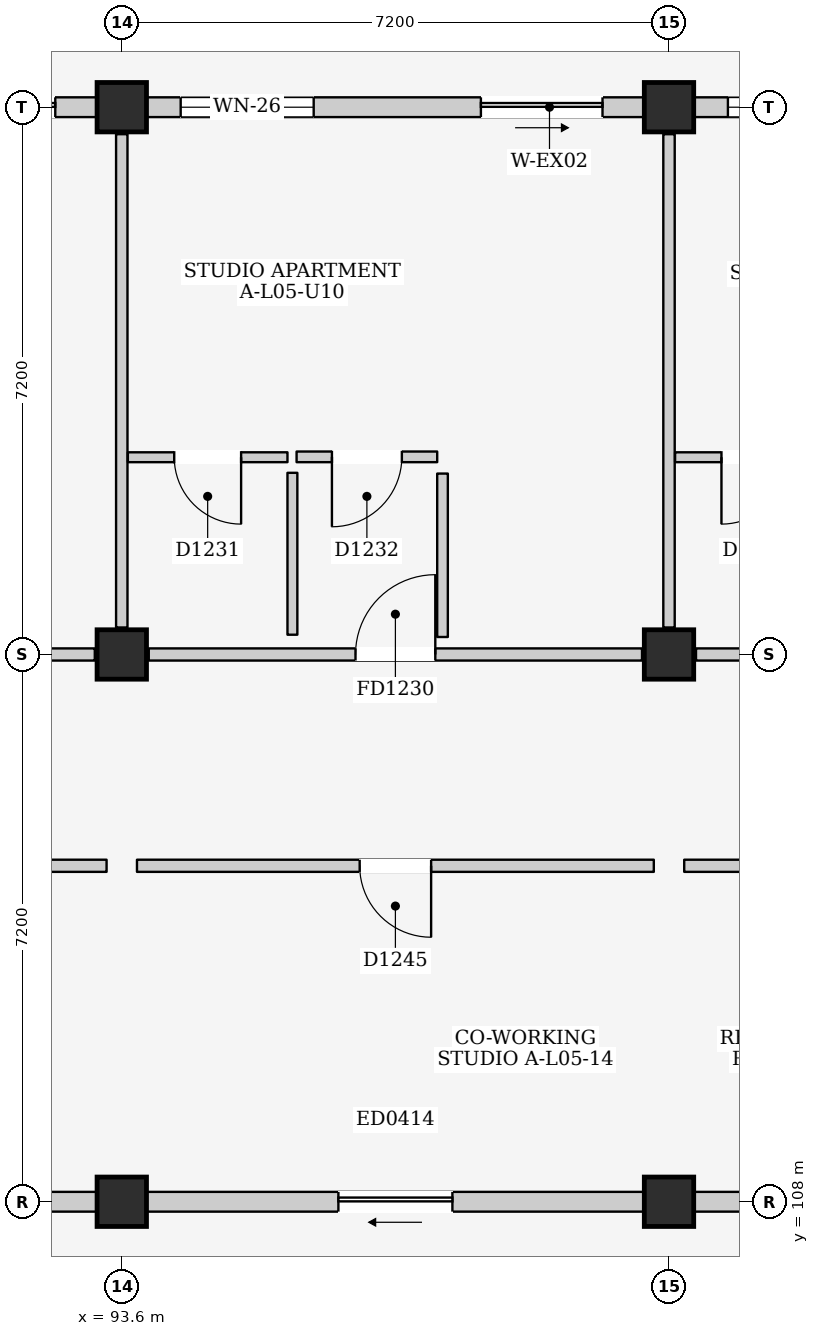
"""IFC4 building model, lengths in metres.
Left out: names, types, materials, properties, quantities, classifications, styles, units other than length and angle.
Written with IfcOpenShell. Run it as: python <this file> out.ifc"""

import sys

from ifc_helpers import new_model, si_unit, direction, frame, frame_2d, origin, origin_2d, place, context, subcontext, project, spatial, rectangle, extrude, element, fill, save


model = new_model("IFC4")
c1 = context("Model", 3, precision=1e-05, world=origin(), true_north=direction((0.0, 1.0)))
c2 = subcontext(c1, "Body", "Model", "MODEL_VIEW")
j1 = project(units=[si_unit("LENGTHUNIT", "METRE"), si_unit("PLANEANGLEUNIT", "RADIAN")], contexts=[c1])
p1 = place(None, origin())
s1 = spatial("IfcSite", under=j1, at=p1, CompositionType="ELEMENT")
p2 = place(p1, origin())
s2 = spatial("IfcBuilding", under=s1, at=p2, CompositionType="ELEMENT")
p3 = place(p2, frame((0.0, 0.0, 18.6)))
s3 = spatial("IfcBuildingStorey", under=s2, at=p3, CompositionType="ELEMENT", Elevation=18.6)
for number, where, z_axis, x_axis in (
    (1, (93.6, 108.0, 0.0), (0.0, 0.0, 1.0), (1.0, 0.0, 0.0)),
    (2, (93.6, 115.2, 0.0), (0.0, 0.0, 1.0), (1.0, 0.0, 0.0)),
    (3, (93.6, 122.4, 0.0), (0.0, 0.0, 1.0), (1.0, 0.0, 0.0)),
    (4, (100.8, 108.0, 0.0), (0.0, 0.0, 1.0), (1.0, 0.0, 0.0)),
    (5, (100.8, 115.2, 0.0), (0.0, 0.0, 1.0), (1.0, 0.0, 0.0)),
    (6, (100.8, 122.4, 0.0), (0.0, 0.0, 1.0), (1.0, 0.0, 0.0)),
):
    element("IfcColumn", number, at=place(p3, frame(where, z_axis=z_axis, x_axis=x_axis)), inside=s3, PredefinedType="COLUMN", context=c2, shape_type="SweptSolid", body=[
        extrude(rectangle(XDim=0.65, YDim=0.65, at=origin_2d()), origin(), (0.0, 0.0, 1.0), 3.3),
    ])
p4 = place(p3, frame((86.725, 122.4, 0.0), z_axis=(0.0, 0.0, 1.0), x_axis=(1.0, 0.0, 0.0)))
e7 = element("IfcWall", 7, at=p4, inside=s3, PredefinedType="ELEMENTEDWALL", context=c2, shape_type="SweptSolid", body=[
    extrude(rectangle(XDim=6.55, YDim=0.26, at=frame_2d((3.275, 0.0))), origin(), (0.0, 0.0, 1.0), 2.595),
])
p5 = place(p4, frame((4.2, 0.0, 0.0)))
e8 = element("IfcOpeningElement", 8, at=p5, cuts=e7, PredefinedType="OPENING", context=c2, shape_type="SweptSolid", body=[
    extrude(rectangle(XDim=1.8, YDim=2.12, at=frame_2d((0.9, 1.06))), frame((0.0, 0.145, 0.0), z_axis=(0.0, -1.0, 0.0), x_axis=(1.0, 0.0, 0.0)), (0.0, 0.0, 1.0), 0.29),
])
p6 = place(p4, frame((0.45, 0.0, 0.885)))
e9 = element("IfcOpeningElement", 9, at=p6, cuts=e7, PredefinedType="OPENING", context=c2, shape_type="SweptSolid", body=[
    extrude(rectangle(XDim=2.05, YDim=1.6, at=frame_2d((1.025, 0.8))), frame((0.0, 0.145, 0.0), z_axis=(0.0, -1.0, 0.0), x_axis=(1.0, 0.0, 0.0)), (0.0, 0.0, 1.0), 0.29),
])
p7 = place(p3, frame((86.725, 108.0, 0.0), z_axis=(0.0, 0.0, 1.0), x_axis=(1.0, 0.0, 0.0)))
e10 = element("IfcWall", 10, at=p7, inside=s3, PredefinedType="ELEMENTEDWALL", context=c2, shape_type="SweptSolid", body=[
    extrude(rectangle(XDim=6.55, YDim=0.26, at=frame_2d((3.275, 0.0))), origin(), (0.0, 0.0, 1.0), 2.395),
])
p8 = place(p7, frame((2.525, 0.0, 0.0)))
e11 = element("IfcOpeningElement", 11, at=p8, cuts=e10, PredefinedType="OPENING", context=c2, shape_type="SweptSolid", body=[
    extrude(rectangle(XDim=1.5, YDim=2.12, at=frame_2d((0.75, 1.06))), frame((0.0, 0.145, 0.0), z_axis=(0.0, -1.0, 0.0), x_axis=(1.0, 0.0, 0.0)), (0.0, 0.0, 1.0), 0.29),
])
p9 = place(p3, frame((93.925, 122.4, 0.0), z_axis=(0.0, 0.0, 1.0), x_axis=(1.0, 0.0, 0.0)))
e12 = element("IfcWall", 12, at=p9, inside=s3, PredefinedType="ELEMENTEDWALL", context=c2, shape_type="SweptSolid", body=[
    extrude(rectangle(XDim=6.55, YDim=0.26, at=frame_2d((3.275, 0.0))), origin(), (0.0, 0.0, 1.0), 2.595),
])
p10 = place(p9, frame((4.4, 0.0, 0.0)))
e13 = element("IfcOpeningElement", 13, at=p10, cuts=e12, PredefinedType="OPENING", context=c2, shape_type="SweptSolid", body=[
    extrude(rectangle(XDim=1.6, YDim=2.12, at=frame_2d((0.8, 1.06))), frame((0.0, 0.145, 0.0), z_axis=(0.0, -1.0, 0.0), x_axis=(1.0, 0.0, 0.0)), (0.0, 0.0, 1.0), 0.29),
])
p11 = place(p9, frame((0.45, 0.0, 0.9)))
e14 = element("IfcOpeningElement", 14, at=p11, cuts=e12, PredefinedType="OPENING", context=c2, shape_type="SweptSolid", body=[
    extrude(rectangle(XDim=1.75, YDim=1.55, at=frame_2d((0.875, 0.775))), frame((0.0, 0.145, 0.0), z_axis=(0.0, -1.0, 0.0), x_axis=(1.0, 0.0, 0.0)), (0.0, 0.0, 1.0), 0.29),
])
p12 = place(p3, frame((93.925, 108.0, 0.0), z_axis=(0.0, 0.0, 1.0), x_axis=(1.0, 0.0, 0.0)))
e15 = element("IfcWall", 15, at=p12, inside=s3, PredefinedType="ELEMENTEDWALL", context=c2, shape_type="SweptSolid", body=[
    extrude(rectangle(XDim=6.55, YDim=0.26, at=frame_2d((3.275, 0.0))), origin(), (0.0, 0.0, 1.0), 2.395),
])
p13 = place(p12, frame((2.525, 0.0, 0.0)))
e16 = element("IfcOpeningElement", 16, at=p13, cuts=e15, PredefinedType="OPENING", context=c2, shape_type="SweptSolid", body=[
    extrude(rectangle(XDim=1.5, YDim=2.12, at=frame_2d((0.75, 1.06))), frame((0.0, 0.145, 0.0), z_axis=(0.0, -1.0, 0.0), x_axis=(1.0, 0.0, 0.0)), (0.0, 0.0, 1.0), 0.29),
])
p14 = place(p3, frame((101.125, 122.4, 0.0), z_axis=(0.0, 0.0, 1.0), x_axis=(1.0, 0.0, 0.0)))
e17 = element("IfcWall", 17, at=p14, inside=s3, PredefinedType="ELEMENTEDWALL", context=c2, shape_type="SweptSolid", body=[
    extrude(rectangle(XDim=6.55, YDim=0.26, at=frame_2d((3.275, 0.0))), origin(), (0.0, 0.0, 1.0), 2.595),
])
p15 = place(p14, frame((4.5, 0.0, 0.0)))
e18 = element("IfcOpeningElement", 18, at=p15, cuts=e17, PredefinedType="OPENING", context=c2, shape_type="SweptSolid", body=[
    extrude(rectangle(XDim=1.5, YDim=2.12, at=frame_2d((0.75, 1.06))), frame((0.0, 0.145, 0.0), z_axis=(0.0, -1.0, 0.0), x_axis=(1.0, 0.0, 0.0)), (0.0, 0.0, 1.0), 0.29),
])
p16 = place(p14, frame((0.45, 0.0, 0.9)))
e19 = element("IfcOpeningElement", 19, at=p16, cuts=e17, PredefinedType="OPENING", context=c2, shape_type="SweptSolid", body=[
    extrude(rectangle(XDim=1.8, YDim=1.5, at=frame_2d((0.9, 0.75))), frame((0.0, 0.145, 0.0), z_axis=(0.0, -1.0, 0.0), x_axis=(1.0, 0.0, 0.0)), (0.0, 0.0, 1.0), 0.29),
])
p17 = place(p3, frame((101.125, 108.0, 0.0), z_axis=(0.0, 0.0, 1.0), x_axis=(1.0, 0.0, 0.0)))
e20 = element("IfcWall", 20, at=p17, inside=s3, PredefinedType="ELEMENTEDWALL", context=c2, shape_type="SweptSolid", body=[
    extrude(rectangle(XDim=6.55, YDim=0.26, at=frame_2d((3.275, 0.0))), origin(), (0.0, 0.0, 1.0), 2.395),
])
p18 = place(p17, frame((2.525, 0.0, 0.0)))
e21 = element("IfcOpeningElement", 21, at=p18, cuts=e20, PredefinedType="OPENING", context=c2, shape_type="SweptSolid", body=[
    extrude(rectangle(XDim=1.5, YDim=2.12, at=frame_2d((0.75, 1.06))), frame((0.0, 0.145, 0.0), z_axis=(0.0, -1.0, 0.0), x_axis=(1.0, 0.0, 0.0)), (0.0, 0.0, 1.0), 0.29),
])
p19 = place(p3, frame((86.755, 115.2, 0.0), z_axis=(0.0, 0.0, 1.0), x_axis=(1.0, 0.0, 0.0)))
e22 = element("IfcWall", 22, at=p19, inside=s3, PredefinedType="PARTITIONING", context=c2, shape_type="SweptSolid", body=[
    extrude(rectangle(XDim=6.49, YDim=0.16, at=frame_2d((3.245, 0.0))), origin(), (0.0, 0.0, 1.0), 2.395),
])
p20 = place(p19, frame((2.72, 0.0, 0.0)))
e23 = element("IfcOpeningElement", 23, at=p20, cuts=e22, PredefinedType="OPENING", context=c2, shape_type="SweptSolid", body=[
    extrude(rectangle(XDim=1.05, YDim=2.15, at=frame_2d((0.525, 1.075))), frame((0.0, 0.095, 0.0), z_axis=(0.0, -1.0, 0.0), x_axis=(1.0, 0.0, 0.0)), (0.0, 0.0, 1.0), 0.19),
])
p21 = place(p3, frame((93.6, 115.555, 0.0), z_axis=(0.0, 0.0, 1.0), x_axis=(0.0, 1.0, 0.0)))
e24 = element("IfcWall", 24, at=p21, inside=s3, PredefinedType="PARTITIONING", context=c2, shape_type="SweptSolid", body=[
    extrude(rectangle(XDim=6.49, YDim=0.15, at=frame_2d((3.245, 0.0))), origin(), (0.0, 0.0, 1.0), 2.545),
])
p22 = place(p3, frame((93.955, 115.2, 0.0), z_axis=(0.0, 0.0, 1.0), x_axis=(1.0, 0.0, 0.0)))
e25 = element("IfcWall", 25, at=p22, inside=s3, PredefinedType="PARTITIONING", context=c2, shape_type="SweptSolid", body=[
    extrude(rectangle(XDim=6.49, YDim=0.16, at=frame_2d((3.245, 0.0))), origin(), (0.0, 0.0, 1.0), 2.395),
])
p23 = place(p22, frame((2.72, 0.0, 0.0)))
e26 = element("IfcOpeningElement", 26, at=p23, cuts=e25, PredefinedType="OPENING", context=c2, shape_type="SweptSolid", body=[
    extrude(rectangle(XDim=1.05, YDim=2.15, at=frame_2d((0.525, 1.075))), frame((0.0, 0.095, 0.0), z_axis=(0.0, -1.0, 0.0), x_axis=(1.0, 0.0, 0.0)), (0.0, 0.0, 1.0), 0.19),
])
p24 = place(p3, frame((100.8, 115.555, 0.0), z_axis=(0.0, 0.0, 1.0), x_axis=(0.0, 1.0, 0.0)))
e27 = element("IfcWall", 27, at=p24, inside=s3, PredefinedType="PARTITIONING", context=c2, shape_type="SweptSolid", body=[
    extrude(rectangle(XDim=6.49, YDim=0.15, at=frame_2d((3.245, 0.0))), origin(), (0.0, 0.0, 1.0), 2.545),
])
p25 = place(p3, frame((93.68, 117.795, 0.0), z_axis=(0.0, 0.0, 1.0), x_axis=(1.0, 0.0, 0.0)))
e28 = element("IfcWall", 28, at=p25, inside=s3, PredefinedType="PARTITIONING", context=c2, shape_type="SweptSolid", body=[
    extrude(rectangle(XDim=2.1, YDim=0.13, at=frame_2d((1.05, 0.0))), origin(), (0.0, 0.0, 1.0), 3.06),
])
p26 = place(p25, frame((0.61, 0.0, 0.0)))
e29 = element("IfcOpeningElement", 29, at=p26, cuts=e28, PredefinedType="OPENING", context=c2, shape_type="SweptSolid", body=[
    extrude(rectangle(XDim=0.88, YDim=2.1, at=frame_2d((0.44, 1.05))), frame((0.0, 0.08, 0.0), z_axis=(0.0, -1.0, 0.0), x_axis=(1.0, 0.0, 0.0)), (0.0, 0.0, 1.0), 0.16),
])
p27 = place(p3, frame((95.845, 115.46, 0.0), z_axis=(0.0, 0.0, 1.0), x_axis=(0.0, 1.0, 0.0)))
e30 = element("IfcWall", 30, at=p27, inside=s3, PredefinedType="PARTITIONING", context=c2, shape_type="SweptSolid", body=[
    extrude(rectangle(XDim=2.13, YDim=0.13, at=frame_2d((1.065, 0.0))), origin(), (0.0, 0.0, 1.0), 3.06),
])
p28 = place(p3, frame((95.9, 117.8, 0.0), z_axis=(0.0, 0.0, 1.0), x_axis=(1.0, 0.0, 0.0)))
e31 = element("IfcWall", 31, at=p28, inside=s3, PredefinedType="PARTITIONING", context=c2, shape_type="SweptSolid", body=[
    extrude(rectangle(XDim=1.85, YDim=0.14, at=frame_2d((0.925, 0.0))), origin(), (0.0, 0.0, 1.0), 3.06),
])
p29 = place(p28, frame((0.465, 0.0, 0.0)))
e32 = element("IfcOpeningElement", 32, at=p29, cuts=e31, PredefinedType="OPENING", context=c2, shape_type="SweptSolid", body=[
    extrude(rectangle(XDim=0.92, YDim=2.1, at=frame_2d((0.46, 1.05))), frame((0.0, 0.085, 0.0), z_axis=(0.0, -1.0, 0.0), x_axis=(1.0, 0.0, 0.0)), (0.0, 0.0, 1.0), 0.17),
])
p30 = place(p3, frame((97.82, 115.43, 0.0), z_axis=(0.0, 0.0, 1.0), x_axis=(0.0, 1.0, 0.0)))
e33 = element("IfcWall", 33, at=p30, inside=s3, PredefinedType="PARTITIONING", context=c2, shape_type="SweptSolid", body=[
    extrude(rectangle(XDim=2.15, YDim=0.14, at=frame_2d((1.075, 0.0))), origin(), (0.0, 0.0, 1.0), 3.06),
])
p31 = place(p3, frame((101.155, 115.2, 0.0), z_axis=(0.0, 0.0, 1.0), x_axis=(1.0, 0.0, 0.0)))
e34 = element("IfcWall", 34, at=p31, inside=s3, PredefinedType="PARTITIONING", context=c2, shape_type="SweptSolid", body=[
    extrude(rectangle(XDim=6.49, YDim=0.16, at=frame_2d((3.245, 0.0))), origin(), (0.0, 0.0, 1.0), 2.395),
])
p32 = place(p31, frame((2.72, 0.0, 0.0)))
e35 = element("IfcOpeningElement", 35, at=p32, cuts=e34, PredefinedType="OPENING", context=c2, shape_type="SweptSolid", body=[
    extrude(rectangle(XDim=1.05, YDim=2.15, at=frame_2d((0.525, 1.075))), frame((0.0, 0.095, 0.0), z_axis=(0.0, -1.0, 0.0), x_axis=(1.0, 0.0, 0.0)), (0.0, 0.0, 1.0), 0.19),
])
p33 = place(p3, frame((100.88, 117.795, 0.0), z_axis=(0.0, 0.0, 1.0), x_axis=(1.0, 0.0, 0.0)))
e36 = element("IfcWall", 36, at=p33, inside=s3, PredefinedType="PARTITIONING", context=c2, shape_type="SweptSolid", body=[
    extrude(rectangle(XDim=2.1, YDim=0.13, at=frame_2d((1.05, 0.0))), origin(), (0.0, 0.0, 1.0), 3.06),
])
p34 = place(p33, frame((0.61, 0.0, 0.0)))
e37 = element("IfcOpeningElement", 37, at=p34, cuts=e36, PredefinedType="OPENING", context=c2, shape_type="SweptSolid", body=[
    extrude(rectangle(XDim=0.88, YDim=2.1, at=frame_2d((0.44, 1.05))), frame((0.0, 0.08, 0.0), z_axis=(0.0, -1.0, 0.0), x_axis=(1.0, 0.0, 0.0)), (0.0, 0.0, 1.0), 0.16),
])
p35 = place(p3, frame((86.6, 112.42, 0.0), z_axis=(0.0, 0.0, 1.0), x_axis=(1.0, 0.0, 0.0)))
e38 = element("IfcWall", 38, at=p35, inside=s3, PredefinedType="PARTITIONING", context=c2, shape_type="SweptSolid", body=[
    extrude(rectangle(XDim=6.8, YDim=0.16, at=frame_2d((3.4, 0.0))), origin(), (0.0, 0.0, 1.0), 3.06),
])
p36 = place(p35, frame((2.93, 0.0, 0.0)))
e39 = element("IfcOpeningElement", 39, at=p36, cuts=e38, PredefinedType="OPENING", context=c2, shape_type="SweptSolid", body=[
    extrude(rectangle(XDim=0.94, YDim=2.12, at=frame_2d((0.47, 1.06))), frame((0.0, 0.095, 0.0), z_axis=(0.0, -1.0, 0.0), x_axis=(1.0, 0.0, 0.0)), (0.0, 0.0, 1.0), 0.19),
])
p37 = place(p3, frame((93.8, 112.42, 0.0), z_axis=(0.0, 0.0, 1.0), x_axis=(1.0, 0.0, 0.0)))
e40 = element("IfcWall", 40, at=p37, inside=s3, PredefinedType="PARTITIONING", context=c2, shape_type="SweptSolid", body=[
    extrude(rectangle(XDim=6.8, YDim=0.16, at=frame_2d((3.4, 0.0))), origin(), (0.0, 0.0, 1.0), 3.06),
])
p38 = place(p37, frame((2.93, 0.0, 0.0)))
e41 = element("IfcOpeningElement", 41, at=p38, cuts=e40, PredefinedType="OPENING", context=c2, shape_type="SweptSolid", body=[
    extrude(rectangle(XDim=0.94, YDim=2.12, at=frame_2d((0.47, 1.06))), frame((0.0, 0.095, 0.0), z_axis=(0.0, -1.0, 0.0), x_axis=(1.0, 0.0, 0.0)), (0.0, 0.0, 1.0), 0.19),
])
p39 = place(p3, frame((101.0, 112.42, 0.0), z_axis=(0.0, 0.0, 1.0), x_axis=(1.0, 0.0, 0.0)))
e42 = element("IfcWall", 42, at=p39, inside=s3, PredefinedType="PARTITIONING", context=c2, shape_type="SweptSolid", body=[
    extrude(rectangle(XDim=6.8, YDim=0.16, at=frame_2d((3.4, 0.0))), origin(), (0.0, 0.0, 1.0), 3.06),
])
p40 = place(p39, frame((2.93, 0.0, 0.0)))
e43 = element("IfcOpeningElement", 43, at=p40, cuts=e42, PredefinedType="OPENING", context=c2, shape_type="SweptSolid", body=[
    extrude(rectangle(XDim=0.94, YDim=2.12, at=frame_2d((0.47, 1.06))), frame((0.0, 0.095, 0.0), z_axis=(0.0, -1.0, 0.0), x_axis=(1.0, 0.0, 0.0)), (0.0, 0.0, 1.0), 0.19),
])
p41 = place(p5, frame((1.8, 0.0, 0.0), z_axis=(0.0, 0.0, 1.0), x_axis=(-1.0, 0.0, 0.0)))
e44 = element("IfcDoor", 44, at=p41, inside=s3, OperationType="SLIDING_TO_LEFT", PredefinedType="DOOR", context=c2, shape_type="SweptSolid", body=[
    extrude(rectangle(XDim=1.8, YDim=2.12, at=frame_2d((0.9, 1.06))), frame((0.0, 0.025, 0.0), z_axis=(0.0, -1.0, 0.0), x_axis=(1.0, 0.0, 0.0)), (0.0, 0.0, 1.0), 0.05),
])
fill(e8, e44)
p42 = place(p10, frame((1.6, 0.0, 0.0), z_axis=(0.0, 0.0, 1.0), x_axis=(-1.0, 0.0, 0.0)))
e45 = element("IfcDoor", 45, at=p42, inside=s3, OperationType="SLIDING_TO_RIGHT", PredefinedType="DOOR", context=c2, shape_type="SweptSolid", body=[
    extrude(rectangle(XDim=1.6, YDim=2.12, at=frame_2d((0.8, 1.06))), frame((0.0, 0.025, 0.0), z_axis=(0.0, -1.0, 0.0), x_axis=(1.0, 0.0, 0.0)), (0.0, 0.0, 1.0), 0.05),
])
fill(e13, e45)
p43 = place(p11, origin())
e46 = element("IfcWindow", 46, at=p43, inside=s3, PartitioningType="DOUBLE_PANEL_VERTICAL", PredefinedType="WINDOW", context=c2, shape_type="SweptSolid", body=[
    extrude(rectangle(XDim=1.75, YDim=1.55, at=frame_2d((0.875, 0.775))), frame((0.0, 0.03, 0.0), z_axis=(0.0, -1.0, 0.0), x_axis=(1.0, 0.0, 0.0)), (0.0, 0.0, 1.0), 0.06),
])
fill(e14, e46)
p44 = place(p13, frame((1.5, 0.0, 0.0), z_axis=(0.0, 0.0, 1.0), x_axis=(-1.0, 0.0, 0.0)))
e47 = element("IfcDoor", 47, at=p44, inside=s3, OperationType="SLIDING_TO_LEFT", PredefinedType="DOOR", context=c2, shape_type="SweptSolid", body=[
    extrude(rectangle(XDim=1.5, YDim=2.12, at=frame_2d((0.75, 1.06))), frame((0.0, 0.025, 0.0), z_axis=(0.0, -1.0, 0.0), x_axis=(1.0, 0.0, 0.0)), (0.0, 0.0, 1.0), 0.05),
])
fill(e16, e47)
p45 = place(p16, origin())
e48 = element("IfcWindow", 48, at=p45, inside=s3, PartitioningType="DOUBLE_PANEL_VERTICAL", PredefinedType="WINDOW", context=c2, shape_type="SweptSolid", body=[
    extrude(rectangle(XDim=1.8, YDim=1.5, at=frame_2d((0.9, 0.75))), frame((0.0, 0.03, 0.0), z_axis=(0.0, -1.0, 0.0), x_axis=(1.0, 0.0, 0.0)), (0.0, 0.0, 1.0), 0.06),
])
fill(e19, e48)
p46 = place(p23, origin())
e49 = element("IfcDoor", 49, at=p46, inside=s3, OperationType="SINGLE_SWING_RIGHT", PredefinedType="DOOR", context=c2, shape_type="SweptSolid", body=[
    extrude(rectangle(XDim=1.05, YDim=2.15, at=frame_2d((0.525, 1.075))), frame((0.0, 0.025, 0.0), z_axis=(0.0, -1.0, 0.0), x_axis=(1.0, 0.0, 0.0)), (0.0, 0.0, 1.0), 0.05),
])
fill(e26, e49)
p47 = place(p26, frame((0.88, 0.0, 0.0), z_axis=(0.0, 0.0, 1.0), x_axis=(-1.0, 0.0, 0.0)))
e50 = element("IfcDoor", 50, at=p47, inside=s3, OperationType="SINGLE_SWING_LEFT", PredefinedType="DOOR", context=c2, shape_type="SweptSolid", body=[
    extrude(rectangle(XDim=0.88, YDim=2.1, at=frame_2d((0.44, 1.05))), frame((0.0, 0.025, 0.0), z_axis=(0.0, -1.0, 0.0), x_axis=(1.0, 0.0, 0.0)), (0.0, 0.0, 1.0), 0.05),
])
fill(e29, e50)
p48 = place(p29, frame((0.92, 0.0, 0.0), z_axis=(0.0, 0.0, 1.0), x_axis=(-1.0, 0.0, 0.0)))
e51 = element("IfcDoor", 51, at=p48, inside=s3, OperationType="SINGLE_SWING_RIGHT", PredefinedType="DOOR", context=c2, shape_type="SweptSolid", body=[
    extrude(rectangle(XDim=0.92, YDim=2.1, at=frame_2d((0.46, 1.05))), frame((0.0, 0.025, 0.0), z_axis=(0.0, -1.0, 0.0), x_axis=(1.0, 0.0, 0.0)), (0.0, 0.0, 1.0), 0.05),
])
fill(e32, e51)
p49 = place(p34, frame((0.88, 0.0, 0.0), z_axis=(0.0, 0.0, 1.0), x_axis=(-1.0, 0.0, 0.0)))
e52 = element("IfcDoor", 52, at=p49, inside=s3, OperationType="SINGLE_SWING_RIGHT", PredefinedType="DOOR", context=c2, shape_type="SweptSolid", body=[
    extrude(rectangle(XDim=0.88, YDim=2.1, at=frame_2d((0.44, 1.05))), frame((0.0, 0.025, 0.0), z_axis=(0.0, -1.0, 0.0), x_axis=(1.0, 0.0, 0.0)), (0.0, 0.0, 1.0), 0.05),
])
fill(e37, e52)
p50 = place(p38, frame((0.94, 0.0, 0.0), z_axis=(0.0, 0.0, 1.0), x_axis=(-1.0, 0.0, 0.0)))
e53 = element("IfcDoor", 53, at=p50, inside=s3, OperationType="SINGLE_SWING_LEFT", PredefinedType="DOOR", context=c2, shape_type="SweptSolid", body=[
    extrude(rectangle(XDim=0.94, YDim=2.12, at=frame_2d((0.47, 1.06))), frame((0.0, 0.025, 0.0), z_axis=(0.0, -1.0, 0.0), x_axis=(1.0, 0.0, 0.0)), (0.0, 0.0, 1.0), 0.05),
])
fill(e41, e53)
save(model, sys.argv[1])
